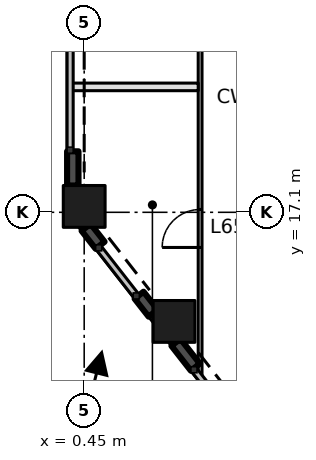
"""IFC4 building model, lengths in metres.
Left out: names, types, materials, properties, quantities, classifications, styles, units other than length and angle.
Written with IfcOpenShell. Run it as: python <this file> out.ifc"""

import sys

from ifc_helpers import new_model, si_unit, direction, frame, frame_2d, origin, origin_2d, place, context, subcontext, project, spatial, rectangle, extrude, element, fill, save


model = new_model("IFC4")
c1 = context("Model", 3, precision=1e-05, world=origin(), true_north=direction((0.0, 1.0)))
c2 = subcontext(c1, "Body", "Model", "MODEL_VIEW")
j1 = project(units=[si_unit("LENGTHUNIT", "METRE"), si_unit("PLANEANGLEUNIT", "RADIAN")], contexts=[c1])
p1 = place(None, origin())
s1 = spatial("IfcSite", under=j1, at=p1, CompositionType="ELEMENT")
p2 = place(p1, origin())
s2 = spatial("IfcBuilding", under=s1, at=p2, CompositionType="ELEMENT")
p3 = place(p2, frame((0.0, 0.0, 284.4)))
s3 = spatial("IfcBuildingStorey", under=s2, at=p3, CompositionType="ELEMENT", Elevation=284.4)
for number, where, z_axis, x_axis in (
    (1, (0.45, 17.255, 0.0), (0.0, 0.0, 1.0), (1.0, 0.0, 0.0)),
    (2, (2.814, 14.229, 0.0), (0.0, 0.0, 1.0), (1.0, 0.0, 0.0)),
):
    element("IfcColumn", number, at=place(p3, frame(where, z_axis=z_axis, x_axis=x_axis)), inside=s3, PredefinedType="COLUMN", context=c2, shape_type="SweptSolid", body=[
        extrude(rectangle(XDim=1.1, YDim=1.1, at=origin_2d()), origin(), (0.0, 0.0, 1.0), 5.4),
    ])
p4 = place(p3, frame((3.5, 12.753, 0.0), z_axis=(0.0, 0.0, 1.0), x_axis=(0.0, 1.0, 0.0)))
e3 = element("IfcWall", 3, at=p4, inside=s3, PredefinedType="PARTITIONING", context=c2, shape_type="SweptSolid", body=[
    extrude(rectangle(XDim=28.647, YDim=0.1, at=frame_2d((14.323, 0.0))), origin(), (0.0, 0.0, 1.0), 5.1),
])
p5 = place(p4, frame((3.422, 0.0, 0.0)))
e4 = element("IfcOpeningElement", 4, at=p5, cuts=e3, PredefinedType="OPENING", context=c2, shape_type="SweptSolid", body=[
    extrude(rectangle(XDim=1.0, YDim=2.1, at=frame_2d((0.5, 1.05))), frame((0.0, 0.06, 0.0), z_axis=(0.0, -1.0, 0.0), x_axis=(1.0, 0.0, 0.0)), (0.0, 0.0, 1.0), 0.12),
])
p6 = place(p4, frame((12.827, 0.0, 0.0)))
e5 = element("IfcOpeningElement", 5, at=p6, cuts=e3, PredefinedType="OPENING", context=c2, shape_type="SweptSolid", body=[
    extrude(rectangle(XDim=1.0, YDim=2.1, at=frame_2d((0.5, 1.05))), frame((0.0, 0.06, 0.0), z_axis=(0.0, -1.0, 0.0), x_axis=(1.0, 0.0, 0.0)), (0.0, 0.0, 1.0), 0.12),
])
p7 = place(p4, frame((23.427, 0.0, 0.0)))
e6 = element("IfcOpeningElement", 6, at=p7, cuts=e3, PredefinedType="OPENING", context=c2, shape_type="SweptSolid", body=[
    extrude(rectangle(XDim=1.0, YDim=2.1, at=frame_2d((0.5, 1.05))), frame((0.0, 0.06, 0.0), z_axis=(0.0, -1.0, 0.0), x_axis=(1.0, 0.0, 0.0)), (0.0, 0.0, 1.0), 0.12),
])
p8 = place(p3, frame((3.45, 20.4, 0.0), z_axis=(0.0, 0.0, 1.0), x_axis=(-1.0, 0.0, 0.0)))
e7 = element("IfcWall", 7, at=p8, inside=s3, PredefinedType="PARTITIONING", context=c2, shape_type="SweptSolid", body=[
    extrude(rectangle(XDim=3.376, YDim=0.2, at=frame_2d((1.688, 0.0))), origin(), (0.0, 0.0, 1.0), 5.1),
])
p9 = place(p3, frame((0.15, 22.404, 2.5), z_axis=(0.0, 0.0, 1.0), x_axis=(0.0, -1.0, 0.0)))
e8 = element("IfcWall", 8, at=p9, inside=s3, PredefinedType="SOLIDWALL", context=c2, shape_type="SweptSolid", body=[
    extrude(rectangle(XDim=4.599, YDim=0.3, at=frame_2d((2.3, 0.0))), origin(), (0.0, 0.0, 1.0), 1.85),
])
p10 = place(p3, frame((0.15, 18.705, 0.0), z_axis=(0.0, 0.0, 1.0), x_axis=(0.0, -1.0, 0.0)))
e9 = element("IfcWall", 9, at=p10, inside=s3, PredefinedType="SOLIDWALL", context=c2, shape_type="SweptSolid", body=[
    extrude(rectangle(XDim=0.9, YDim=0.3, at=frame_2d((0.45, 0.0))), origin(), (0.0, 0.0, 1.0), 2.5),
])
p11 = place(p3, frame((0.499, 16.705, 2.5), z_axis=(0.0, 0.0, 1.0), x_axis=(0.615648999949, -0.78802050028, 0.0)))
e10 = element("IfcWall", 10, at=p11, inside=s3, PredefinedType="SOLIDWALL", context=c2, shape_type="SweptSolid", body=[
    extrude(rectangle(XDim=2.867, YDim=0.3, at=frame_2d((1.433, 0.0))), origin(), (0.0, 0.0, 1.0), 1.85),
])
p12 = place(p3, frame((0.499, 16.705, 0.0), z_axis=(0.0, 0.0, 1.0), x_axis=(0.615880679474, -0.787839443447, 0.0)))
e11 = element("IfcWall", 11, at=p12, inside=s3, PredefinedType="SOLIDWALL", context=c2, shape_type="SweptSolid", body=[
    extrude(rectangle(XDim=0.601, YDim=0.3, at=frame_2d((0.3, 0.0))), origin(), (0.0, 0.0, 1.0), 2.5),
])
p13 = place(p3, frame((1.894, 14.919, 0.0), z_axis=(0.0, 0.0, 1.0), x_axis=(0.616077973909, -0.787685171921, 0.0)))
e12 = element("IfcWall", 12, at=p13, inside=s3, PredefinedType="SOLIDWALL", context=c2, shape_type="SweptSolid", body=[
    extrude(rectangle(XDim=0.6, YDim=0.3, at=frame_2d((0.3, 0.0))), origin(), (0.0, 0.0, 1.0), 2.5),
])
p14 = place(p3, frame((2.863, 13.679, 2.5), z_axis=(0.0, 0.0, 1.0), x_axis=(0.615727244794, -0.787959364446, 0.0)))
e13 = element("IfcWall", 13, at=p14, inside=s3, PredefinedType="SOLIDWALL", context=c2, shape_type="SweptSolid", body=[
    extrude(rectangle(XDim=4.726, YDim=0.3, at=frame_2d((2.363, 0.0))), origin(), (0.0, 0.0, 1.0), 1.85),
])
p15 = place(p3, frame((2.863, 13.679, 0.0), z_axis=(0.0, 0.0, 1.0), x_axis=(0.615809291242, -0.787895244827, 0.0)))
e14 = element("IfcWall", 14, at=p15, inside=s3, PredefinedType="SOLIDWALL", context=c2, shape_type="SweptSolid", body=[
    extrude(rectangle(XDim=0.831, YDim=0.3, at=frame_2d((0.416, 0.0))), origin(), (0.0, 0.0, 1.0), 2.5),
])
p16 = place(p5, origin())
e15 = element("IfcDoor", 15, at=p16, inside=s3, OperationType="SINGLE_SWING_LEFT", PredefinedType="DOOR", context=c2, shape_type="SweptSolid", body=[
    extrude(rectangle(XDim=1.0, YDim=2.1, at=frame_2d((0.5, 1.05))), frame((0.0, 0.025, 0.0), z_axis=(0.0, -1.0, 0.0), x_axis=(1.0, 0.0, 0.0)), (0.0, 0.0, 1.0), 0.05),
])
fill(e4, e15)
save(model, sys.argv[1])
